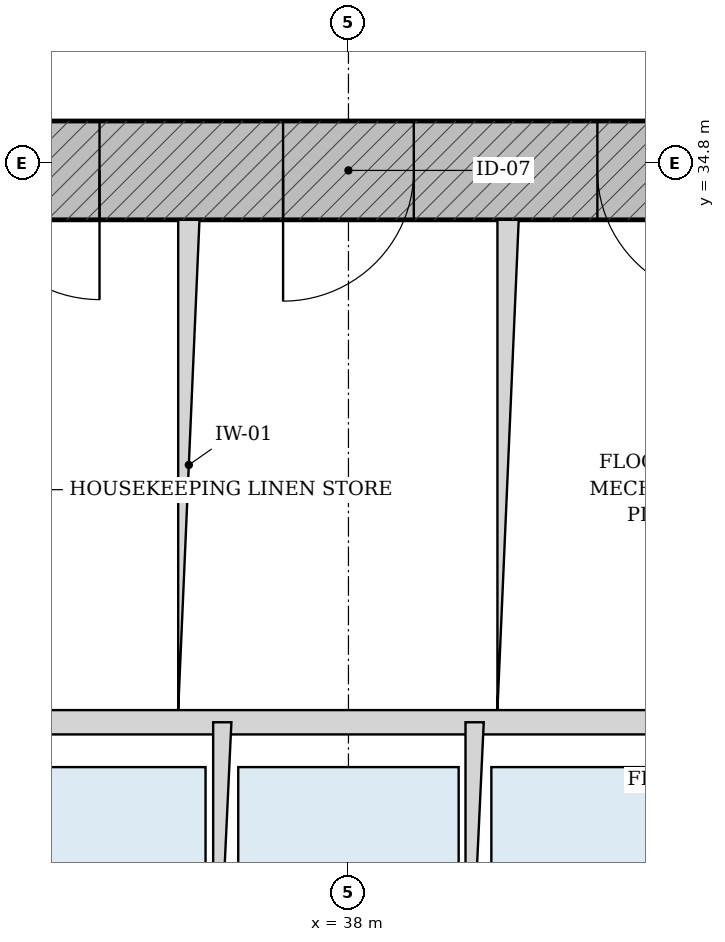
"""IFC4 building model, lengths in metres.
Left out: names, types, materials, properties, quantities, classifications, styles, units other than length and angle.
Written with IfcOpenShell. Run it as: python <this file> out.ifc"""

import sys

from ifc_helpers import new_model, si_unit, direction, frame, frame_2d, origin, place, context, subcontext, project, spatial, rectangle, extrude, source, transform, mapped, element, fill, save


model = new_model("IFC4")
c1 = context("Model", 3, precision=1e-05, world=origin(), true_north=direction((-0.2419218956, 0.970295726276)))
c2 = subcontext(c1, "Body", "Model", "MODEL_VIEW")
j1 = project(units=[si_unit("LENGTHUNIT", "METRE"), si_unit("PLANEANGLEUNIT", "RADIAN")], contexts=[c1])
p1 = place(None, origin())
s1 = spatial("IfcSite", under=j1, at=p1, CompositionType="ELEMENT")
p2 = place(p1, origin())
s2 = spatial("IfcBuilding", under=s1, at=p2, CompositionType="ELEMENT")
p3 = place(p2, frame((0.0, 0.0, 130.2)))
s3 = spatial("IfcBuildingStorey", under=s2, at=p3, CompositionType="ELEMENT", Elevation=130.2)
p4 = place(p3, frame((28.725, 34.75, 0.0), z_axis=(0.0, 0.0, 1.0), x_axis=(1.0, 0.0, 0.0)))
e1 = element("IfcWall", 1, at=p4, inside=s3, PredefinedType="SHEAR", context=c2, shape_type="SweptSolid", body=[
    extrude(rectangle(XDim=18.55, YDim=0.65, at=frame_2d((9.275, 0.0))), origin(), (0.0, 0.0, 1.0), 4.93),
])
p5 = place(p4, frame((6.788, 0.0, 0.0)))
e2 = element("IfcOpeningElement", 2, at=p5, cuts=e1, PredefinedType="OPENING", context=c2, shape_type="SweptSolid", body=[
    extrude(rectangle(XDim=0.85, YDim=2.1, at=frame_2d((0.425, 1.05))), frame((0.0, 0.335, 0.0), z_axis=(0.0, -1.0, 0.0), x_axis=(1.0, 0.0, 0.0)), (0.0, 0.0, 1.0), 0.67),
])
p6 = place(p4, frame((8.845, 0.0, 0.0)))
e3 = element("IfcOpeningElement", 3, at=p6, cuts=e1, PredefinedType="OPENING", context=c2, shape_type="SweptSolid", body=[
    extrude(rectangle(XDim=0.86, YDim=2.1, at=frame_2d((0.43, 1.05))), frame((0.0, 0.335, 0.0), z_axis=(0.0, -1.0, 0.0), x_axis=(1.0, 0.0, 0.0)), (0.0, 0.0, 1.0), 0.67),
])
p7 = place(p4, frame((10.913, 0.0, 0.0)))
e4 = element("IfcOpeningElement", 4, at=p7, cuts=e1, PredefinedType="OPENING", context=c2, shape_type="SweptSolid", body=[
    extrude(rectangle(XDim=0.85, YDim=2.1, at=frame_2d((0.425, 1.05))), frame((0.0, 0.335, 0.0), z_axis=(0.0, -1.0, 0.0), x_axis=(1.0, 0.0, 0.0)), (0.0, 0.0, 1.0), 0.67),
])
p8 = place(p3, frame((35.025, 31.12, 0.0), z_axis=(0.0, 0.0, 1.0), x_axis=(1.0, 0.0, 0.0)))
e5 = element("IfcWall", 5, at=p8, inside=s3, PredefinedType="PARTITIONING", context=c2, shape_type="SweptSolid", body=[
    extrude(rectangle(XDim=5.95, YDim=0.16, at=frame_2d((2.975, 0.0))), origin(), (0.0, 0.0, 1.0), 4.93),
])
for number, where, z_axis, x_axis in (
    (6, (37.17, 28.56, 0.0), (0.0, 0.0, 1.0), (0.0, 1.0, 0.0)),
    (7, (38.83, 28.56, 0.0), (0.0, 0.0, 1.0), (0.0, 1.0, 0.0)),
):
    element("IfcWall", number, at=place(p3, frame(where, z_axis=z_axis, x_axis=x_axis)), inside=s3, PredefinedType="PARTITIONING", context=c2, shape_type="SweptSolid", body=[
        extrude(rectangle(XDim=2.56, YDim=0.12, at=frame_2d((1.28, 0.0))), origin(), (0.0, 0.0, 1.0), 4.93),
    ])
for number, where, z_axis, x_axis in (
    (8, (36.95, 31.2, 0.0), (0.0, 0.0, 1.0), (0.0, 1.0, 0.0)),
    (9, (39.05, 31.2, 0.0), (0.0, 0.0, 1.0), (0.0, 1.0, 0.0)),
):
    element("IfcWall", number, at=place(p3, frame(where, z_axis=z_axis, x_axis=x_axis)), inside=s3, PredefinedType="PARTITIONING", context=c2, shape_type="SweptSolid", body=[
        extrude(rectangle(XDim=3.225, YDim=0.14, at=frame_2d((1.613, 0.0))), origin(), (0.0, 0.0, 1.0), 4.93),
    ])
m1 = source(origin(), c2, "Body", "SweptSolid", [
    extrude(rectangle(XDim=0.85, YDim=2.1, at=frame_2d((0.425, 1.05))), frame((0.0, 0.025, 0.0), z_axis=(0.0, -1.0, 0.0), x_axis=(1.0, 0.0, 0.0)), (0.0, 0.0, 1.0), 0.05),
])
p9 = place(p5, frame((0.85, 0.0, 0.0), z_axis=(0.0, 0.0, 1.0), x_axis=(-1.0, 0.0, 0.0)))
e10 = element("IfcDoor", 10, at=p9, inside=s3, OperationType="SINGLE_SWING_LEFT", PredefinedType="DOOR", context=c2, shape_type="MappedRepresentation", body=[
    mapped(m1, transform((0.0, 0.0, 0.0), scale=1.0)),
])
fill(e2, e10)
m2 = source(origin(), c2, "Body", "SweptSolid", [
    extrude(rectangle(XDim=0.86, YDim=2.1, at=frame_2d((0.43, 1.05))), frame((0.0, 0.025, 0.0), z_axis=(0.0, -1.0, 0.0), x_axis=(1.0, 0.0, 0.0)), (0.0, 0.0, 1.0), 0.05),
])
p10 = place(p6, frame((0.86, 0.0, 0.0), z_axis=(0.0, 0.0, 1.0), x_axis=(-1.0, 0.0, 0.0)))
e11 = element("IfcDoor", 11, at=p10, inside=s3, OperationType="SINGLE_SWING_RIGHT", PredefinedType="DOOR", context=c2, shape_type="MappedRepresentation", body=[
    mapped(m2, transform((0.0, 0.0, 0.0), scale=1.0)),
])
fill(e3, e11)
p11 = place(p7, frame((0.85, 0.0, 0.0), z_axis=(0.0, 0.0, 1.0), x_axis=(-1.0, 0.0, 0.0)))
e12 = element("IfcDoor", 12, at=p11, inside=s3, OperationType="SINGLE_SWING_LEFT", PredefinedType="DOOR", context=c2, shape_type="MappedRepresentation", body=[
    mapped(m1, transform((0.0, 0.0, 0.0), scale=1.0)),
])
fill(e4, e12)
save(model, sys.argv[1])
